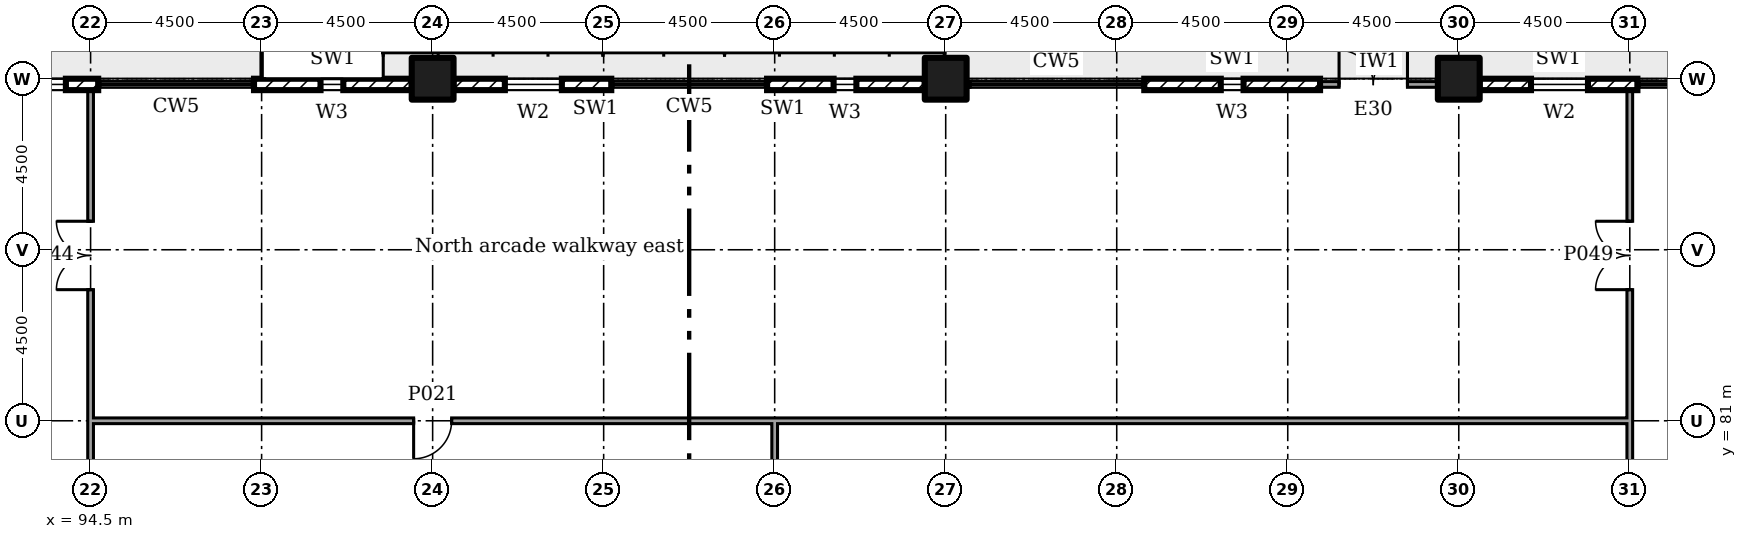
"""IFC4 building model, lengths in metres.
Left out: names, types, materials, properties, quantities, classifications, styles, units other than length and angle.
Written with IfcOpenShell. Run it as: python <this file> out.ifc"""

import sys

from ifc_helpers import new_model, si_unit, direction, frame, frame_2d, origin, origin_2d, place, context, subcontext, project, spatial, rectangle, extrude, element, fill, save


model = new_model("IFC4")
c1 = context("Model", 3, precision=1e-05, world=origin(), true_north=direction((0.0, 1.0)))
c2 = subcontext(c1, "Body", "Model", "MODEL_VIEW")
j1 = project(units=[si_unit("LENGTHUNIT", "METRE"), si_unit("PLANEANGLEUNIT", "RADIAN")], contexts=[c1])
p1 = place(None, origin())
s1 = spatial("IfcSite", under=j1, at=p1, CompositionType="ELEMENT")
p2 = place(p1, origin())
s2 = spatial("IfcBuilding", under=s1, at=p2, CompositionType="ELEMENT")
p3 = place(p2, frame((0.0, 0.0, 6.0)))
s3 = spatial("IfcBuildingStorey", under=s2, at=p3, CompositionType="ELEMENT", Elevation=6.0)
for number, where in (
    (1, (103.5, 90.0, 0.0)),
    (2, (117.0, 90.0, 0.0)),
    (3, (130.5, 90.0, 0.0)),
):
    element("IfcColumn", number, at=place(p3, frame(where)), inside=s3, PredefinedType="COLUMN", context=c2, shape_type="SweptSolid", body=[
        extrude(rectangle(XDim=1.1, YDim=1.1, at=origin_2d()), origin(), (0.0, 0.0, 1.0), 5.5),
    ])
p4 = place(p3, frame((135.2, 89.85, 0.0), z_axis=(0.0, 0.0, 1.0), x_axis=(-1.0, 0.0, 0.0)))
e4 = element("IfcWall", 4, at=p4, inside=s3, PredefinedType="ELEMENTEDWALL", context=c2, shape_type="SweptSolid", body=[
    extrude(rectangle(XDim=4.15, YDim=0.3, at=frame_2d((2.075, 0.0))), origin(), (0.0, 0.0, 1.0), 5.05),
])
p5 = place(p4, frame((1.3, 0.0, 0.9)))
e5 = element("IfcOpeningElement", 5, at=p5, cuts=e4, PredefinedType="OPENING", context=c2, shape_type="SweptSolid", body=[
    extrude(rectangle(XDim=1.5, YDim=1.8, at=frame_2d((0.75, 0.9))), frame((0.0, 0.16, 0.0), z_axis=(0.0, -1.0, 0.0), x_axis=(1.0, 0.0, 0.0)), (0.0, 0.0, 1.0), 0.32),
])
p6 = place(p3, frame((129.95, 89.85, 0.0), z_axis=(0.0, 0.0, 1.0), x_axis=(-1.0, 0.0, 0.0)))
e6 = element("IfcWall", 6, at=p6, inside=s3, PredefinedType="SOLIDWALL", context=c2, shape_type="SweptSolid", body=[
    extrude(rectangle(XDim=3.1, YDim=0.15, at=frame_2d((1.55, 0.0))), origin(), (0.0, 0.0, 1.0), 5.05),
])
p7 = place(p6, frame((0.8, 0.0, 0.0)))
e7 = element("IfcOpeningElement", 7, at=p7, cuts=e6, PredefinedType="OPENING", context=c2, shape_type="SweptSolid", body=[
    extrude(rectangle(XDim=1.8, YDim=2.4, at=frame_2d((0.9, 1.2))), frame((0.0, 0.085, 0.0), z_axis=(0.0, -1.0, 0.0), x_axis=(1.0, 0.0, 0.0)), (0.0, 0.0, 1.0), 0.17),
])
p8 = place(p3, frame((126.85, 89.85, 0.0), z_axis=(0.0, 0.0, 1.0), x_axis=(-1.0, 0.0, 0.0)))
e8 = element("IfcWall", 8, at=p8, inside=s3, PredefinedType="ELEMENTEDWALL", context=c2, shape_type="SweptSolid", body=[
    extrude(rectangle(XDim=4.625, YDim=0.3, at=frame_2d((2.312, 0.0))), origin(), (0.0, 0.0, 1.0), 5.05),
])
p9 = place(p8, frame((2.012, 0.0, 0.45)))
e9 = element("IfcOpeningElement", 9, at=p9, cuts=e8, PredefinedType="OPENING", context=c2, shape_type="SweptSolid", body=[
    extrude(rectangle(XDim=0.6, YDim=2.4, at=frame_2d((0.3, 1.2))), frame((0.0, 0.16, 0.0), z_axis=(0.0, -1.0, 0.0), x_axis=(1.0, 0.0, 0.0)), (0.0, 0.0, 1.0), 0.32),
])
p10 = place(p3, frame((116.45, 89.85, 0.0), z_axis=(0.0, 0.0, 1.0), x_axis=(-1.0, 0.0, 0.0)))
e10 = element("IfcWall", 10, at=p10, inside=s3, PredefinedType="ELEMENTEDWALL", context=c2, shape_type="SweptSolid", body=[
    extrude(rectangle(XDim=4.15, YDim=0.3, at=frame_2d((2.075, 0.0))), origin(), (0.0, 0.0, 1.0), 5.05),
])
p11 = place(p10, frame((1.8, 0.0, 0.45)))
e11 = element("IfcOpeningElement", 11, at=p11, cuts=e10, PredefinedType="OPENING", context=c2, shape_type="SweptSolid", body=[
    extrude(rectangle(XDim=0.6, YDim=2.4, at=frame_2d((0.3, 1.2))), frame((0.0, 0.16, 0.0), z_axis=(0.0, -1.0, 0.0), x_axis=(1.0, 0.0, 0.0)), (0.0, 0.0, 1.0), 0.32),
])
p12 = place(p3, frame((108.2, 89.85, 0.0), z_axis=(0.0, 0.0, 1.0), x_axis=(-1.0, 0.0, 0.0)))
e12 = element("IfcWall", 12, at=p12, inside=s3, PredefinedType="ELEMENTEDWALL", context=c2, shape_type="SweptSolid", body=[
    extrude(rectangle(XDim=4.15, YDim=0.3, at=frame_2d((2.075, 0.0))), origin(), (0.0, 0.0, 1.0), 5.05),
])
p13 = place(p12, frame((1.3, 0.0, 0.9)))
e13 = element("IfcOpeningElement", 13, at=p13, cuts=e12, PredefinedType="OPENING", context=c2, shape_type="SweptSolid", body=[
    extrude(rectangle(XDim=1.5, YDim=1.8, at=frame_2d((0.75, 0.9))), frame((0.0, 0.16, 0.0), z_axis=(0.0, -1.0, 0.0), x_axis=(1.0, 0.0, 0.0)), (0.0, 0.0, 1.0), 0.32),
])
p14 = place(p3, frame((102.95, 89.85, 0.0), z_axis=(0.0, 0.0, 1.0), x_axis=(-1.0, 0.0, 0.0)))
e14 = element("IfcWall", 14, at=p14, inside=s3, PredefinedType="ELEMENTEDWALL", context=c2, shape_type="SweptSolid", body=[
    extrude(rectangle(XDim=4.15, YDim=0.3, at=frame_2d((2.075, 0.0))), origin(), (0.0, 0.0, 1.0), 5.05),
])
p15 = place(p14, frame((1.8, 0.0, 0.45)))
e15 = element("IfcOpeningElement", 15, at=p15, cuts=e14, PredefinedType="OPENING", context=c2, shape_type="SweptSolid", body=[
    extrude(rectangle(XDim=0.6, YDim=2.4, at=frame_2d((0.3, 1.2))), frame((0.0, 0.16, 0.0), z_axis=(0.0, -1.0, 0.0), x_axis=(1.0, 0.0, 0.0)), (0.0, 0.0, 1.0), 0.32),
])
p16 = place(p3, frame((94.7, 89.85, 0.0), z_axis=(0.0, 0.0, 1.0), x_axis=(-1.0, 0.0, 0.0)))
e16 = element("IfcWall", 16, at=p16, inside=s3, PredefinedType="ELEMENTEDWALL", context=c2, shape_type="SweptSolid", body=[
    extrude(rectangle(XDim=4.15, YDim=0.3, at=frame_2d((2.075, 0.0))), origin(), (0.0, 0.0, 1.0), 5.05),
])
p17 = place(p16, frame((0.85, 0.0, 0.45)))
e17 = element("IfcOpeningElement", 17, at=p17, cuts=e16, PredefinedType="OPENING", context=c2, shape_type="SweptSolid", body=[
    extrude(rectangle(XDim=2.4, YDim=2.4, at=frame_2d((1.2, 1.2))), frame((0.0, 0.16, 0.0), z_axis=(0.0, -1.0, 0.0), x_axis=(1.0, 0.0, 0.0)), (0.0, 0.0, 1.0), 0.32),
])
p18 = place(p3, frame((94.5, 80.925, 0.0), z_axis=(0.0, 0.0, 1.0), x_axis=(0.0, 1.0, 0.0)))
e18 = element("IfcWall", 18, at=p18, inside=s3, PredefinedType="PARTITIONING", context=c2, shape_type="SweptSolid", body=[
    extrude(rectangle(XDim=8.775, YDim=0.15, at=frame_2d((4.387, 0.0))), origin(), (0.0, 0.0, 1.0), 5.05),
])
p19 = place(p18, frame((3.525, 0.0, 0.0)))
e19 = element("IfcOpeningElement", 19, at=p19, cuts=e18, PredefinedType="OPENING", context=c2, shape_type="SweptSolid", body=[
    extrude(rectangle(XDim=1.8, YDim=2.1, at=frame_2d((0.9, 1.05))), frame((0.0, 0.085, 0.0), z_axis=(0.0, -1.0, 0.0), x_axis=(1.0, 0.0, 0.0)), (0.0, 0.0, 1.0), 0.17),
])
p20 = place(p3, frame((94.5, 76.5, 0.0), z_axis=(0.0, 0.0, 1.0), x_axis=(0.0, 1.0, 0.0)))
e20 = element("IfcWall", 20, at=p20, inside=s3, PredefinedType="PARTITIONING", context=c2, shape_type="SweptSolid", body=[
    extrude(rectangle(XDim=4.5, YDim=0.15, at=frame_2d((2.25, 0.0))), origin(), (0.0, 0.0, 1.0), 5.05),
])
p21 = place(p3, frame((135.0, 80.925, 0.0), z_axis=(0.0, 0.0, 1.0), x_axis=(0.0, 1.0, 0.0)))
e21 = element("IfcWall", 21, at=p21, inside=s3, PredefinedType="PARTITIONING", context=c2, shape_type="SweptSolid", body=[
    extrude(rectangle(XDim=8.775, YDim=0.15, at=frame_2d((4.387, 0.0))), origin(), (0.0, 0.0, 1.0), 5.05),
])
p22 = place(p21, frame((3.525, 0.0, 0.0)))
e22 = element("IfcOpeningElement", 22, at=p22, cuts=e21, PredefinedType="OPENING", context=c2, shape_type="SweptSolid", body=[
    extrude(rectangle(XDim=1.8, YDim=2.1, at=frame_2d((0.9, 1.05))), frame((0.0, 0.085, 0.0), z_axis=(0.0, -1.0, 0.0), x_axis=(1.0, 0.0, 0.0)), (0.0, 0.0, 1.0), 0.17),
])
p23 = place(p3, frame((135.0, 58.5, 0.0), z_axis=(0.0, 0.0, 1.0), x_axis=(0.0, 1.0, 0.0)))
e23 = element("IfcWall", 23, at=p23, inside=s3, PredefinedType="PARTITIONING", context=c2, shape_type="SweptSolid", body=[
    extrude(rectangle(XDim=22.5, YDim=0.15, at=frame_2d((11.25, 0.0))), origin(), (0.0, 0.0, 1.0), 5.05),
])
p24 = place(p23, frame((10.75, 0.0, 0.0)))
e24 = element("IfcOpeningElement", 24, at=p24, cuts=e23, PredefinedType="OPENING", context=c2, shape_type="SweptSolid", body=[
    extrude(rectangle(XDim=1.0, YDim=2.1, at=frame_2d((0.5, 1.05))), frame((0.0, 0.085, 0.0), z_axis=(0.0, -1.0, 0.0), x_axis=(1.0, 0.0, 0.0)), (0.0, 0.0, 1.0), 0.17),
])
p25 = place(p3, frame((94.575, 81.0, 0.0)))
e25 = element("IfcWall", 25, at=p25, inside=s3, PredefinedType="PARTITIONING", context=c2, shape_type="SweptSolid", body=[
    extrude(rectangle(XDim=18.0, YDim=0.15, at=frame_2d((9.0, 0.0))), origin(), (0.0, 0.0, 1.0), 5.05),
])
p26 = place(p25, frame((8.425, 0.0, 0.0)))
e26 = element("IfcOpeningElement", 26, at=p26, cuts=e25, PredefinedType="OPENING", context=c2, shape_type="SweptSolid", body=[
    extrude(rectangle(XDim=1.0, YDim=2.1, at=frame_2d((0.5, 1.05))), frame((0.0, 0.085, 0.0), z_axis=(0.0, -1.0, 0.0), x_axis=(1.0, 0.0, 0.0)), (0.0, 0.0, 1.0), 0.17),
])
p27 = place(p3, frame((112.5, 81.0, 0.0)))
e27 = element("IfcWall", 27, at=p27, inside=s3, PredefinedType="PARTITIONING", context=c2, shape_type="SweptSolid", body=[
    extrude(rectangle(XDim=22.425, YDim=0.15, at=frame_2d((11.212, 0.0))), origin(), (0.0, 0.0, 1.0), 5.05),
])
p28 = place(p3, frame((112.5, 59.495, 0.0), z_axis=(0.0, 0.0, 1.0), x_axis=(0.0, 1.0, 0.0)))
e28 = element("IfcWall", 28, at=p28, inside=s3, PredefinedType="PARTITIONING", context=c2, shape_type="SweptSolid", body=[
    extrude(rectangle(XDim=21.43, YDim=0.15, at=frame_2d((10.715, 0.0))), origin(), (0.0, 0.0, 1.0), 5.05),
])
p29 = place(p5, origin())
e29 = element("IfcWindow", 29, at=p29, inside=s3, PartitioningType="SINGLE_PANEL", PredefinedType="WINDOW", context=c2, shape_type="SweptSolid", body=[
    extrude(rectangle(XDim=1.5, YDim=1.8, at=frame_2d((0.75, 0.9))), frame((0.0, 0.03, 0.0), z_axis=(0.0, -1.0, 0.0), x_axis=(1.0, 0.0, 0.0)), (0.0, 0.0, 1.0), 0.06),
])
fill(e5, e29)
p30 = place(p7, frame((1.8, 0.0, 0.0), x_axis=(-1.0, 0.0, 0.0)))
e30 = element("IfcDoor", 30, at=p30, inside=s3, OperationType="DOUBLE_DOOR_DOUBLE_SWING", PredefinedType="NOTDEFINED", context=c2, shape_type="SweptSolid", body=[
    extrude(rectangle(XDim=1.8, YDim=2.4, at=frame_2d((0.9, 1.2))), frame((0.0, 0.025, 0.0), z_axis=(0.0, -1.0, 0.0), x_axis=(1.0, 0.0, 0.0)), (0.0, 0.0, 1.0), 0.05),
])
fill(e7, e30)
p31 = place(p9, origin())
e31 = element("IfcWindow", 31, at=p31, inside=s3, PartitioningType="SINGLE_PANEL", PredefinedType="WINDOW", context=c2, shape_type="SweptSolid", body=[
    extrude(rectangle(XDim=0.6, YDim=2.4, at=frame_2d((0.3, 1.2))), frame((0.0, 0.03, 0.0), z_axis=(0.0, -1.0, 0.0), x_axis=(1.0, 0.0, 0.0)), (0.0, 0.0, 1.0), 0.06),
])
fill(e9, e31)
p32 = place(p11, origin())
e32 = element("IfcWindow", 32, at=p32, inside=s3, PartitioningType="SINGLE_PANEL", PredefinedType="WINDOW", context=c2, shape_type="SweptSolid", body=[
    extrude(rectangle(XDim=0.6, YDim=2.4, at=frame_2d((0.3, 1.2))), frame((0.0, 0.03, 0.0), z_axis=(0.0, -1.0, 0.0), x_axis=(1.0, 0.0, 0.0)), (0.0, 0.0, 1.0), 0.06),
])
fill(e11, e32)
p33 = place(p13, origin())
e33 = element("IfcWindow", 33, at=p33, inside=s3, PartitioningType="SINGLE_PANEL", PredefinedType="WINDOW", context=c2, shape_type="SweptSolid", body=[
    extrude(rectangle(XDim=1.5, YDim=1.8, at=frame_2d((0.75, 0.9))), frame((0.0, 0.03, 0.0), z_axis=(0.0, -1.0, 0.0), x_axis=(1.0, 0.0, 0.0)), (0.0, 0.0, 1.0), 0.06),
])
fill(e13, e33)
p34 = place(p15, origin())
e34 = element("IfcWindow", 34, at=p34, inside=s3, PartitioningType="SINGLE_PANEL", PredefinedType="WINDOW", context=c2, shape_type="SweptSolid", body=[
    extrude(rectangle(XDim=0.6, YDim=2.4, at=frame_2d((0.3, 1.2))), frame((0.0, 0.03, 0.0), z_axis=(0.0, -1.0, 0.0), x_axis=(1.0, 0.0, 0.0)), (0.0, 0.0, 1.0), 0.06),
])
fill(e15, e34)
p35 = place(p17, origin())
e35 = element("IfcWindow", 35, at=p35, inside=s3, PartitioningType="SINGLE_PANEL", PredefinedType="WINDOW", context=c2, shape_type="SweptSolid", body=[
    extrude(rectangle(XDim=2.4, YDim=2.4, at=frame_2d((1.2, 1.2))), frame((0.0, 0.03, 0.0), z_axis=(0.0, -1.0, 0.0), x_axis=(1.0, 0.0, 0.0)), (0.0, 0.0, 1.0), 0.06),
])
fill(e17, e35)
p36 = place(p26, frame((1.0, 0.0, 0.0), x_axis=(-1.0, 0.0, 0.0)))
e36 = element("IfcDoor", 36, at=p36, inside=s3, OperationType="SINGLE_SWING_LEFT", PredefinedType="DOOR", context=c2, shape_type="SweptSolid", body=[
    extrude(rectangle(XDim=1.0, YDim=2.1, at=frame_2d((0.5, 1.05))), frame((0.0, 0.025, 0.0), z_axis=(0.0, -1.0, 0.0), x_axis=(1.0, 0.0, 0.0)), (0.0, 0.0, 1.0), 0.05),
])
fill(e26, e36)
p37 = place(p19, origin())
e37 = element("IfcDoor", 37, at=p37, inside=s3, OperationType="DOUBLE_DOOR_SINGLE_SWING", PredefinedType="DOOR", context=c2, shape_type="SweptSolid", body=[
    extrude(rectangle(XDim=1.8, YDim=2.1, at=frame_2d((0.9, 1.05))), frame((0.0, 0.025, 0.0), z_axis=(0.0, -1.0, 0.0), x_axis=(1.0, 0.0, 0.0)), (0.0, 0.0, 1.0), 0.05),
])
fill(e19, e37)
p38 = place(p22, origin())
e38 = element("IfcDoor", 38, at=p38, inside=s3, OperationType="DOUBLE_DOOR_SINGLE_SWING", PredefinedType="DOOR", context=c2, shape_type="SweptSolid", body=[
    extrude(rectangle(XDim=1.8, YDim=2.1, at=frame_2d((0.9, 1.05))), frame((0.0, 0.025, 0.0), z_axis=(0.0, -1.0, 0.0), x_axis=(1.0, 0.0, 0.0)), (0.0, 0.0, 1.0), 0.05),
])
fill(e22, e38)
save(model, sys.argv[1])
